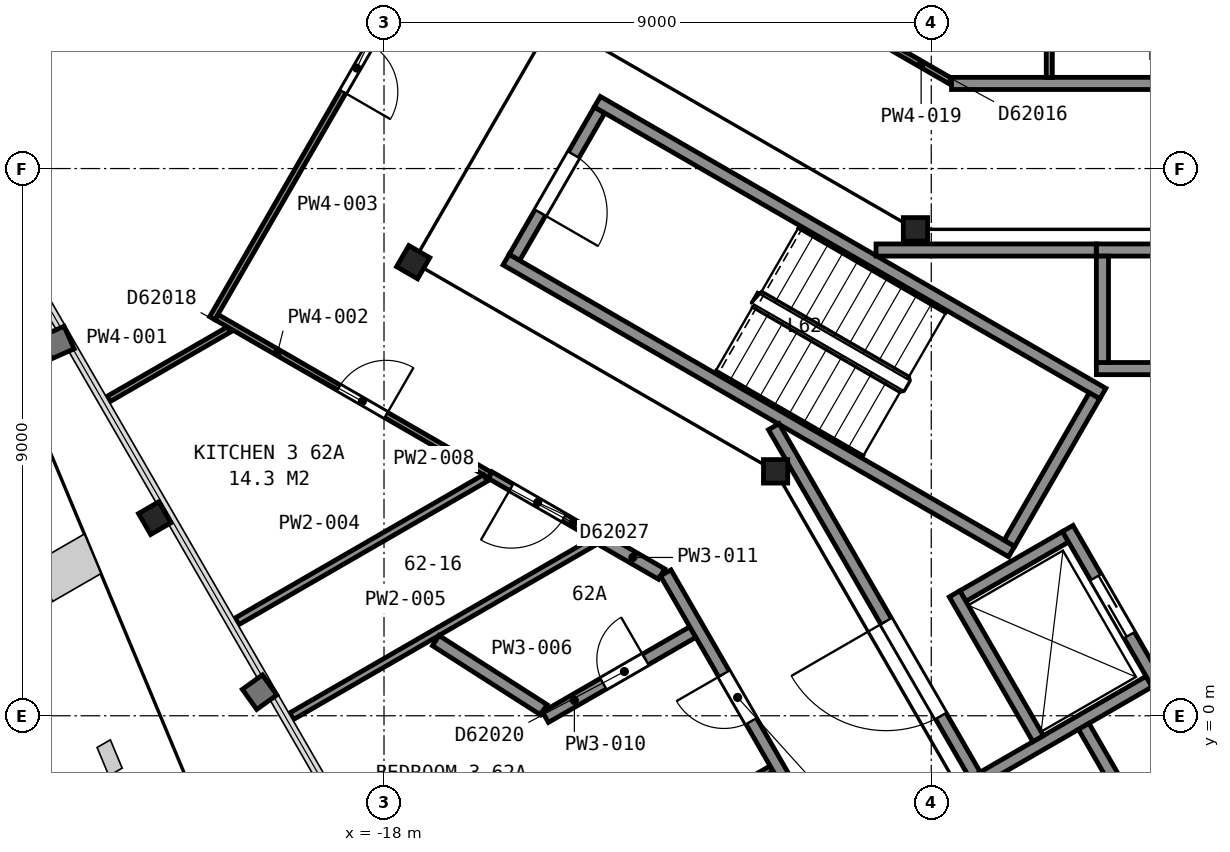
"""IFC4 building model, lengths in metres.
Left out: names, types, materials, properties, quantities, classifications, styles, units other than length and angle.
Written with IfcOpenShell. Run it as: python <this file> out.ifc"""

import sys

from ifc_helpers import new_model, si_unit, direction, frame, frame_2d, origin, origin_2d, place, context, subcontext, project, spatial, rectangle, i_section, extrude, element, fill, save


model = new_model("IFC4")
c1 = context("Model", 3, precision=1e-05, world=origin(), true_north=direction((0.0, 1.0)))
c2 = subcontext(c1, "Body", "Model", "MODEL_VIEW")
j1 = project(units=[si_unit("LENGTHUNIT", "METRE"), si_unit("PLANEANGLEUNIT", "RADIAN")], contexts=[c1])
p1 = place(None, origin())
s1 = spatial("IfcSite", under=j1, at=p1, CompositionType="ELEMENT")
p2 = place(p1, origin())
s2 = spatial("IfcBuilding", under=s1, at=p2, CompositionType="ELEMENT")
p3 = place(p2, frame((0.0, 0.0, 247.1)))
s3 = spatial("IfcBuildingStorey", under=s2, at=p3, CompositionType="ELEMENT", Elevation=247.1)
p4 = place(p3, frame((-21.77, 3.25, 0.035), z_axis=(0.0, 0.0, 1.0), x_axis=(-0.5, 0.866025403784, 0.0)))
e1 = element("IfcColumn", 1, at=p4, inside=s3, PredefinedType="COLUMN", context=c2, shape_type="SweptSolid", body=[
    extrude(i_section(OverallWidth=0.399, OverallDepth=0.386, WebThickness=0.021, FlangeThickness=0.033, FilletRadius=0.015, at=origin_2d()), origin(), (0.0, 0.0, 1.0), 3.665),
])
p5 = place(p3, frame((-9.26, 8.0, 0.0), z_axis=(0.0, 0.0, 1.0), x_axis=(1.0, 0.0, 0.0)))
e2 = element("IfcColumn", 2, at=p5, inside=s3, PredefinedType="COLUMN", context=c2, shape_type="SweptSolid", body=[
    extrude(i_section(OverallWidth=0.399, OverallDepth=0.386, WebThickness=0.021, FlangeThickness=0.033, FilletRadius=0.015, at=origin_2d()), origin(), (0.0, 0.0, 1.0), 3.7),
])
p6 = place(p3, frame((-17.52, 7.46, 0.0), z_axis=(0.0, 0.0, 1.0), x_axis=(0.5, 0.866025403784, 0.0)))
e3 = element("IfcColumn", 3, at=p6, inside=s3, PredefinedType="COLUMN", context=c2, shape_type="SweptSolid", body=[
    extrude(i_section(OverallWidth=0.401, OverallDepth=0.399, WebThickness=0.025, FlangeThickness=0.04, FilletRadius=0.015, at=origin_2d()), origin(), (0.0, 0.0, 1.0), 3.7),
])
p7 = place(p3, frame((-11.56, 4.02, 0.0), z_axis=(0.0, 0.0, 1.0), x_axis=(1.0, 0.0, 0.0)))
e4 = element("IfcColumn", 4, at=p7, inside=s3, PredefinedType="COLUMN", context=c2, shape_type="SweptSolid", body=[
    extrude(i_section(OverallWidth=0.399, OverallDepth=0.386, WebThickness=0.021, FlangeThickness=0.033, FilletRadius=0.015, at=origin_2d()), origin(), (0.0, 0.0, 1.0), 3.7),
])
p8 = place(p3, frame((-14.455, 9.962, 0.0), z_axis=(0.0, 0.0, 1.0), x_axis=(-0.500049511043, -0.865996816683, 0.0)))
e5 = element("IfcWall", 5, at=p8, inside=s3, PredefinedType="PARTITIONING", context=c2, shape_type="SweptSolid", body=[
    extrude(rectangle(XDim=2.8, YDim=0.2, at=frame_2d((1.4, 0.0))), origin(), (0.0, 0.0, 1.0), 3.45),
])
p9 = place(p8, frame((0.85, 0.0, 0.0)))
e6 = element("IfcOpeningElement", 6, at=p9, cuts=e5, PredefinedType="OPENING", context=c2, shape_type="SweptSolid", body=[
    extrude(rectangle(XDim=1.1, YDim=2.1, at=frame_2d((0.55, 1.05))), frame((0.0, 0.11, 0.0), z_axis=(0.0, -1.0, 0.0), x_axis=(1.0, 0.0, 0.0)), (0.0, 0.0, 1.0), 0.22),
])
for number, where, z_axis, x_axis in (
    (7, (-7.678, 2.701, 0.0), (0.0, 0.0, 1.0), (-0.866, 0.5, 0.0)),
    (8, (-6.178, 5.299, 0.0), (0.0, 0.0, 1.0), (-0.866, 0.5, 0.0)),
):
    element("IfcWall", number, at=place(p3, frame(where, z_axis=z_axis, x_axis=x_axis)), inside=s3, PredefinedType="PARTITIONING", context=c2, shape_type="SweptSolid", body=[
        extrude(rectangle(XDim=9.6, YDim=0.2, at=frame_2d((4.8, 0.0))), origin(), (0.0, 0.0, 1.0), 3.45),
    ])
p10 = place(p3, frame((-6.315, 5.262, 0.0), z_axis=(0.0, 0.0, 1.0), x_axis=(-0.500049511043, -0.865996816683, 0.0)))
e9 = element("IfcWall", 9, at=p10, inside=s3, PredefinedType="PARTITIONING", context=c2, shape_type="SweptSolid", body=[
    extrude(rectangle(XDim=2.8, YDim=0.2, at=frame_2d((1.4, 0.0))), origin(), (0.0, 0.0, 1.0), 3.45),
])
for number, where, z_axis, x_axis in (
    (10, (-6.285, 5.71, 0.0), (0.0, 0.0, 1.0), (1.0, 0.0, 0.0)),
    (11, (-6.285, 7.66, 0.0), (0.0, 0.0, 1.0), (1.0, 0.0, 0.0)),
):
    element("IfcWall", number, at=place(p3, frame(where, z_axis=z_axis, x_axis=x_axis)), inside=s3, PredefinedType="PARTITIONING", context=c2, shape_type="SweptSolid", body=[
        extrude(rectangle(XDim=2.35, YDim=0.2, at=frame_2d((1.175, 0.0))), origin(), (0.0, 0.0, 1.0), 3.7),
    ])
p11 = place(p3, frame((-8.145, -1.013, 0.0), z_axis=(0.0, 0.0, 1.0), x_axis=(0.866016494683, 0.500015430699, 0.0)))
e12 = element("IfcWall", 12, at=p11, inside=s3, PredefinedType="PARTITIONING", context=c2, shape_type="SweptSolid", body=[
    extrude(rectangle(XDim=3.15, YDim=0.2, at=frame_2d((1.575, 0.0))), origin(), (0.0, 0.0, 1.0), 3.7),
])
p12 = place(p3, frame((-8.48, 1.969, 0.0), z_axis=(0.0, 0.0, 1.0), x_axis=(0.866000020948, 0.500043961785, 0.0)))
e13 = element("IfcWall", 13, at=p12, inside=s3, PredefinedType="PARTITIONING", context=c2, shape_type="SweptSolid", body=[
    extrude(rectangle(XDim=1.95, YDim=0.2, at=frame_2d((0.975, 0.0))), origin(), (0.0, 0.0, 1.0), 3.7),
])
p13 = place(p3, frame((-6.185, 5.81, 0.0), z_axis=(0.0, 0.0, 1.0), x_axis=(0.0, 1.0, 0.0)))
e14 = element("IfcWall", 14, at=p13, inside=s3, PredefinedType="PARTITIONING", context=c2, shape_type="SweptSolid", body=[
    extrude(rectangle(XDim=1.75, YDim=0.2, at=frame_2d((0.875, 0.0))), origin(), (0.0, 0.0, 1.0), 3.7),
])
p14 = place(p3, frame((-5.28, 0.525, 0.0), z_axis=(0.0, 0.0, 1.0), x_axis=(-0.500037662692, 0.866003658127, 0.0)))
e15 = element("IfcWall", 15, at=p14, inside=s3, PredefinedType="PARTITIONING", context=c2, shape_type="SweptSolid", body=[
    extrude(rectangle(XDim=2.95, YDim=0.2, at=frame_2d((1.475, 0.0))), origin(), (0.0, 0.0, 1.0), 3.7),
])
p15 = place(p14, frame((0.925, 0.0, 0.0)))
e16 = element("IfcOpeningElement", 16, at=p15, cuts=e15, PredefinedType="OPENING", context=c2, shape_type="SweptSolid", body=[
    extrude(rectangle(XDim=1.1, YDim=2.1, at=frame_2d((0.55, 1.05))), frame((0.0, 0.11, 0.0), z_axis=(0.0, -1.0, 0.0), x_axis=(1.0, 0.0, 0.0)), (0.0, 0.0, 1.0), 0.22),
])
p16 = place(p3, frame((-5.318, -2.21, 0.0), z_axis=(0.0, 0.0, 1.0), x_axis=(-0.499938297808, 0.866061024631, 0.0)))
e17 = element("IfcWall", 17, at=p16, inside=s3, PredefinedType="PARTITIONING", context=c2, shape_type="SweptSolid", body=[
    extrude(rectangle(XDim=2.35, YDim=0.2, at=frame_2d((1.175, 0.0))), origin(), (0.0, 0.0, 1.0), 3.7),
])
p17 = place(p3, frame((-7.242, -0.376, 0.0), z_axis=(0.0, 0.0, 1.0), x_axis=(-0.499996545922, 0.866027397988, 0.0)))
e18 = element("IfcWall", 18, at=p17, inside=s3, PredefinedType="PARTITIONING", context=c2, shape_type="SweptSolid", body=[
    extrude(rectangle(XDim=2.75, YDim=0.2, at=frame_2d((1.375, 0.0))), origin(), (0.0, 0.0, 1.0), 3.7),
])
p18 = place(p3, frame((-11.591, 4.755, 0.0), z_axis=(0.0, 0.0, 1.0), x_axis=(0.500043977787, -0.866000011708, 0.0)))
e19 = element("IfcWall", 19, at=p18, inside=s3, PredefinedType="PARTITIONING", context=c2, shape_type="SweptSolid", body=[
    extrude(rectangle(XDim=6.617, YDim=0.2, at=frame_2d((3.308, 0.0))), origin(), (0.0, 0.0, 1.0), 3.45),
])
p19 = place(p18, frame((3.695, 0.0, 0.0)))
e20 = element("IfcOpeningElement", 20, at=p19, cuts=e19, PredefinedType="OPENING", context=c2, shape_type="SweptSolid", body=[
    extrude(rectangle(XDim=1.8, YDim=2.1, at=frame_2d((0.9, 1.05))), frame((0.0, 0.11, 0.0), z_axis=(0.0, -1.0, 0.0), x_axis=(1.0, 0.0, 0.0)), (0.0, 0.0, 1.0), 0.22),
])
p20 = place(p3, frame((-9.908, 7.66, 0.0), z_axis=(0.0, 0.0, 1.0), x_axis=(1.0, 0.0, 0.0)))
e21 = element("IfcWall", 21, at=p20, inside=s3, PredefinedType="PARTITIONING", context=c2, shape_type="SweptSolid", body=[
    extrude(rectangle(XDim=3.621, YDim=0.2, at=frame_2d((1.811, 0.0))), origin(), (0.0, 0.0, 1.0), 3.45),
])
p21 = place(p3, frame((-22.53, 5.21, 0.0), z_axis=(0.0, 0.0, 1.0), x_axis=(0.865865073245, 0.500277597875, 0.0)))
e22 = element("IfcWall", 22, at=p21, inside=s3, PredefinedType="PARTITIONING", context=c2, shape_type="SweptSolid", body=[
    extrude(rectangle(XDim=2.284, YDim=0.1, at=frame_2d((1.142, 0.0))), origin(), (0.0, 0.0, 1.0), 2.713),
])
p22 = place(p3, frame((-16.253, 3.957, 0.0), z_axis=(0.0, 0.0, 1.0), x_axis=(-0.866006514596, 0.500032715607, 0.0)))
e23 = element("IfcWall", 23, at=p22, inside=s3, PredefinedType="PARTITIONING", context=c2, shape_type="SweptSolid", body=[
    extrude(rectangle(XDim=5.199, YDim=0.1, at=frame_2d((2.6, 0.0))), origin(), (0.0, 0.0, 1.0), 2.713),
])
p23 = place(p22, frame((1.978, 0.0, 0.0)))
e24 = element("IfcOpeningElement", 24, at=p23, cuts=e23, PredefinedType="OPENING", context=c2, shape_type="SweptSolid", body=[
    extrude(rectangle(XDim=0.9, YDim=2.1, at=frame_2d((0.45, 1.05))), frame((0.0, 0.06, 0.0), z_axis=(0.0, -1.0, 0.0), x_axis=(1.0, 0.0, 0.0)), (0.0, 0.0, 1.0), 0.12),
])
p24 = place(p3, frame((-20.824, 6.539, 0.0), z_axis=(0.0, 0.0, 1.0), x_axis=(0.500297300687, 0.865853689098, 0.0)))
e25 = element("IfcWall", 25, at=p24, inside=s3, PredefinedType="PARTITIONING", context=c2, shape_type="SweptSolid", body=[
    extrude(rectangle(XDim=9.496, YDim=0.1, at=frame_2d((4.748, 0.0))), origin(), (0.0, 0.0, 1.0), 2.713),
])
p25 = place(p24, frame((4.3, 0.0, 0.0)))
e26 = element("IfcOpeningElement", 26, at=p25, cuts=e25, PredefinedType="OPENING", context=c2, shape_type="SweptSolid", body=[
    extrude(rectangle(XDim=0.9, YDim=2.1, at=frame_2d((0.45, 1.05))), frame((0.0, 0.06, 0.0), z_axis=(0.0, -1.0, 0.0), x_axis=(1.0, 0.0, 0.0)), (0.0, 0.0, 1.0), 0.12),
])
p26 = place(p3, frame((-20.418, 1.553, 0.0), z_axis=(0.0, 0.0, 1.0), x_axis=(0.8660976733, 0.49987480463, 0.0)))
e27 = element("IfcWall", 27, at=p26, inside=s3, PredefinedType="PARTITIONING", context=c2, shape_type="SweptSolid", body=[
    extrude(rectangle(XDim=4.717, YDim=0.125, at=frame_2d((2.358, 0.0))), origin(), (0.0, 0.0, 1.0), 2.713),
])
p27 = place(p3, frame((-19.518, -0.006, 0.0), z_axis=(0.0, 0.0, 1.0), x_axis=(0.866072118736, 0.499919078599, 0.0)))
e28 = element("IfcWall", 28, at=p27, inside=s3, PredefinedType="PARTITIONING", context=c2, shape_type="SweptSolid", body=[
    extrude(rectangle(XDim=5.912, YDim=0.125, at=frame_2d((2.956, 0.0))), origin(), (0.0, 0.0, 1.0), 2.713),
])
p28 = place(p3, frame((-17.149, 1.236, 0.0), z_axis=(0.0, 0.0, 1.0), x_axis=(0.842376529327, -0.538889397593, 0.0)))
e29 = element("IfcWall", 29, at=p28, inside=s3, PredefinedType="PARTITIONING", context=c2, shape_type="SweptSolid", body=[
    extrude(rectangle(XDim=2.108, YDim=0.2, at=frame_2d((1.054, 0.0))), origin(), (0.0, 0.0, 1.0), 2.713),
])
p29 = place(p3, frame((-17.171, -4.071, 0.0), z_axis=(0.0, 0.0, 1.0), x_axis=(0.865973383125, 0.500090091603, 0.0)))
e30 = element("IfcWall", 30, at=p29, inside=s3, PredefinedType="PARTITIONING", context=c2, shape_type="SweptSolid", body=[
    extrude(rectangle(XDim=6.4, YDim=0.1, at=frame_2d((3.2, 0.0))), origin(), (0.0, 0.0, 1.0), 2.713),
])
p30 = place(p3, frame((-16.253, 3.957, 0.0), z_axis=(0.0, 0.0, 1.0), x_axis=(0.866173232673, -0.499743865396, 0.0)))
e31 = element("IfcWall", 31, at=p30, inside=s3, PredefinedType="PARTITIONING", context=c2, shape_type="SweptSolid", body=[
    extrude(rectangle(XDim=1.974, YDim=0.125, at=frame_2d((0.987, 0.0))), origin(), (0.0, 0.0, 1.0), 2.713),
])
p31 = place(p30, frame((0.4, 0.0, 0.0)))
e32 = element("IfcOpeningElement", 32, at=p31, cuts=e31, PredefinedType="OPENING", context=c2, shape_type="SweptSolid", body=[
    extrude(rectangle(XDim=1.0, YDim=2.1, at=frame_2d((0.5, 1.05))), frame((0.0, 0.073, 0.0), z_axis=(0.0, -1.0, 0.0), x_axis=(1.0, 0.0, 0.0)), (0.0, 0.0, 1.0), 0.145),
])
p32 = place(p3, frame((-15.346, -0.023, 0.0), z_axis=(0.0, 0.0, 1.0), x_axis=(0.865969158485, 0.500097407065, 0.0)))
e33 = element("IfcWall", 33, at=p32, inside=s3, PredefinedType="PARTITIONING", context=c2, shape_type="SweptSolid", body=[
    extrude(rectangle(XDim=2.799, YDim=0.2, at=frame_2d((1.4, 0.0))), origin(), (0.0, 0.0, 1.0), 2.713),
])
p33 = place(p32, frame((1.1, 0.0, 0.0)))
e34 = element("IfcOpeningElement", 34, at=p33, cuts=e33, PredefinedType="OPENING", context=c2, shape_type="SweptSolid", body=[
    extrude(rectangle(XDim=0.8, YDim=2.1, at=frame_2d((0.4, 1.05))), frame((0.0, 0.11, 0.0), z_axis=(0.0, -1.0, 0.0), x_axis=(1.0, 0.0, 0.0)), (0.0, 0.0, 1.0), 0.22),
])
p34 = place(p3, frame((-14.381, 2.877, 0.0), z_axis=(0.0, 0.0, 1.0), x_axis=(0.866215333661, -0.499670887416, 0.0)))
e35 = element("IfcWall", 35, at=p34, inside=s3, PredefinedType="PARTITIONING", context=c2, shape_type="SweptSolid", body=[
    extrude(rectangle(XDim=1.093, YDim=0.2, at=frame_2d((0.546, 0.0))), origin(), (0.0, 0.0, 1.0), 2.713),
])
p35 = place(p3, frame((-4.675, -12.706, 0.0), z_axis=(0.0, 0.0, 1.0), x_axis=(-0.499972470324, 0.866041297467, 0.0)))
e36 = element("IfcWall", 36, at=p35, inside=s3, PredefinedType="PARTITIONING", context=c2, shape_type="SweptSolid", body=[
    extrude(rectangle(XDim=17.385, YDim=0.2, at=frame_2d((8.692, 0.0))), origin(), (0.0, 0.0, 1.0), 2.713),
])
p36 = place(p35, frame((14.57, 0.0, 0.0)))
e37 = element("IfcOpeningElement", 37, at=p36, cuts=e36, PredefinedType="OPENING", context=c2, shape_type="SweptSolid", body=[
    extrude(rectangle(XDim=0.9, YDim=2.1, at=frame_2d((0.45, 1.05))), frame((0.0, 0.11, 0.0), z_axis=(0.0, -1.0, 0.0), x_axis=(1.0, 0.0, 0.0)), (0.0, 0.0, 1.0), 0.22),
])
p37 = place(p35, frame((11.777, 0.0, 0.0)))
e38 = element("IfcOpeningElement", 38, at=p37, cuts=e36, PredefinedType="OPENING", context=c2, shape_type="SweptSolid", body=[
    extrude(rectangle(XDim=0.9, YDim=2.1, at=frame_2d((0.45, 1.05))), frame((0.0, 0.11, 0.0), z_axis=(0.0, -1.0, 0.0), x_axis=(1.0, 0.0, 0.0)), (0.0, 0.0, 1.0), 0.22),
])
p38 = place(p35, frame((5.095, 0.0, 0.0)))
e39 = element("IfcOpeningElement", 39, at=p38, cuts=e36, PredefinedType="OPENING", context=c2, shape_type="SweptSolid", body=[
    extrude(rectangle(XDim=0.9, YDim=2.1, at=frame_2d((0.45, 1.05))), frame((0.0, 0.11, 0.0), z_axis=(0.0, -1.0, 0.0), x_axis=(1.0, 0.0, 0.0)), (0.0, 0.0, 1.0), 0.22),
])
p39 = place(p3, frame((-11.357, 11.982, 0.0), z_axis=(0.0, 0.0, 1.0), x_axis=(0.866039032844, -0.499976393034, 0.0)))
e40 = element("IfcWall", 40, at=p39, inside=s3, PredefinedType="PARTITIONING", context=c2, shape_type="SweptSolid", body=[
    extrude(rectangle(XDim=3.079, YDim=0.1, at=frame_2d((1.54, 0.0))), origin(), (0.0, 0.0, 1.0), 2.713),
])
p40 = place(p39, frame((1.08, 0.0, 0.0)))
e41 = element("IfcOpeningElement", 41, at=p40, cuts=e40, PredefinedType="OPENING", context=c2, shape_type="SweptSolid", body=[
    extrude(rectangle(XDim=0.9, YDim=2.1, at=frame_2d((0.45, 1.05))), frame((0.0, 0.06, 0.0), z_axis=(0.0, -1.0, 0.0), x_axis=(1.0, 0.0, 0.0)), (0.0, 0.0, 1.0), 0.12),
])
p41 = place(p3, frame((-8.667, 10.4, 0.0), z_axis=(0.0, 0.0, 1.0), x_axis=(1.0, 0.0, 0.0)))
e42 = element("IfcWall", 42, at=p41, inside=s3, PredefinedType="PARTITIONING", context=c2, shape_type="SweptSolid", body=[
    extrude(rectangle(XDim=17.384, YDim=0.2, at=frame_2d((8.692, 0.0))), origin(), (0.0, 0.0, 1.0), 2.713),
])
p42 = place(p41, frame((12.425, 0.0, 0.0)))
e43 = element("IfcOpeningElement", 43, at=p42, cuts=e42, PredefinedType="OPENING", context=c2, shape_type="SweptSolid", body=[
    extrude(rectangle(XDim=0.9, YDim=2.1, at=frame_2d((0.45, 1.05))), frame((0.0, 0.11, 0.0), z_axis=(0.0, -1.0, 0.0), x_axis=(1.0, 0.0, 0.0)), (0.0, 0.0, 1.0), 0.22),
])
p43 = place(p41, frame((7.716, 0.0, 0.0)))
e44 = element("IfcOpeningElement", 44, at=p43, cuts=e42, PredefinedType="OPENING", context=c2, shape_type="SweptSolid", body=[
    extrude(rectangle(XDim=0.9, YDim=2.1, at=frame_2d((0.45, 1.05))), frame((0.0, 0.11, 0.0), z_axis=(0.0, -1.0, 0.0), x_axis=(1.0, 0.0, 0.0)), (0.0, 0.0, 1.0), 0.22),
])
p44 = place(p41, frame((3.358, 0.0, 0.0)))
e45 = element("IfcOpeningElement", 45, at=p44, cuts=e42, PredefinedType="OPENING", context=c2, shape_type="SweptSolid", body=[
    extrude(rectangle(XDim=0.9, YDim=2.1, at=frame_2d((0.45, 1.05))), frame((0.0, 0.11, 0.0), z_axis=(0.0, -1.0, 0.0), x_axis=(1.0, 0.0, 0.0)), (0.0, 0.0, 1.0), 0.22),
])
p45 = place(p3, frame((-7.059, 10.5, 0.0), z_axis=(0.0, 0.0, 1.0), x_axis=(0.0, 1.0, 0.0)))
e46 = element("IfcWall", 46, at=p45, inside=s3, PredefinedType="PARTITIONING", context=c2, shape_type="SweptSolid", body=[
    extrude(rectangle(XDim=6.406, YDim=0.1, at=frame_2d((3.203, 0.0))), origin(), (0.0, 0.0, 1.0), 2.713),
])
p46 = place(p9, origin())
e47 = element("IfcDoor", 47, at=p46, inside=s3, OperationType="SINGLE_SWING_RIGHT", PredefinedType="DOOR", context=c2, shape_type="SweptSolid", body=[
    extrude(rectangle(XDim=1.1, YDim=2.1, at=frame_2d((0.55, 1.05))), frame((0.0, 0.025, 0.0), z_axis=(0.0, -1.0, 0.0), x_axis=(1.0, 0.0, 0.0)), (0.0, 0.0, 1.0), 0.05),
])
fill(e6, e47)
p47 = place(p15, origin())
e48 = element("IfcDoor", 48, at=p47, inside=s3, OperationType="SLIDING_TO_LEFT", PredefinedType="DOOR", context=c2, shape_type="SweptSolid", body=[
    extrude(rectangle(XDim=1.1, YDim=2.1, at=frame_2d((0.55, 1.05))), frame((0.0, 0.025, 0.0), z_axis=(0.0, -1.0, 0.0), x_axis=(1.0, 0.0, 0.0)), (0.0, 0.0, 1.0), 0.05),
])
fill(e16, e48)
p48 = place(p19, origin())
e49 = element("IfcDoor", 49, at=p48, inside=s3, OperationType="DOUBLE_DOOR_SINGLE_SWING", PredefinedType="DOOR", context=c2, shape_type="SweptSolid", body=[
    extrude(rectangle(XDim=1.8, YDim=2.1, at=frame_2d((0.9, 1.05))), frame((0.0, 0.025, 0.0), z_axis=(0.0, -1.0, 0.0), x_axis=(1.0, 0.0, 0.0)), (0.0, 0.0, 1.0), 0.05),
])
fill(e20, e49)
p49 = place(p23, origin())
e50 = element("IfcDoor", 50, at=p49, inside=s3, OperationType="SINGLE_SWING_LEFT", PredefinedType="DOOR", context=c2, shape_type="SweptSolid", body=[
    extrude(rectangle(XDim=0.9, YDim=2.1, at=frame_2d((0.45, 1.05))), frame((0.0, 0.025, 0.0), z_axis=(0.0, -1.0, 0.0), x_axis=(1.0, 0.0, 0.0)), (0.0, 0.0, 1.0), 0.05),
])
fill(e24, e50)
p50 = place(p25, origin())
e51 = element("IfcDoor", 51, at=p50, inside=s3, OperationType="SINGLE_SWING_LEFT", PredefinedType="DOOR", context=c2, shape_type="SweptSolid", body=[
    extrude(rectangle(XDim=0.9, YDim=2.1, at=frame_2d((0.45, 1.05))), frame((0.0, 0.025, 0.0), z_axis=(0.0, -1.0, 0.0), x_axis=(1.0, 0.0, 0.0)), (0.0, 0.0, 1.0), 0.05),
])
fill(e26, e51)
p51 = place(p31, origin())
e52 = element("IfcDoor", 52, at=p51, inside=s3, OperationType="SINGLE_SWING_LEFT", PredefinedType="DOOR", context=c2, shape_type="SweptSolid", body=[
    extrude(rectangle(XDim=1.0, YDim=2.1, at=frame_2d((0.5, 1.05))), frame((0.0, 0.025, 0.0), z_axis=(0.0, -1.0, 0.0), x_axis=(1.0, 0.0, 0.0)), (0.0, 0.0, 1.0), 0.05),
])
fill(e32, e52)
p52 = place(p33, origin())
e53 = element("IfcDoor", 53, at=p52, inside=s3, OperationType="SINGLE_SWING_RIGHT", PredefinedType="DOOR", context=c2, shape_type="SweptSolid", body=[
    extrude(rectangle(XDim=0.8, YDim=2.1, at=frame_2d((0.4, 1.05))), frame((0.0, 0.025, 0.0), z_axis=(0.0, -1.0, 0.0), x_axis=(1.0, 0.0, 0.0)), (0.0, 0.0, 1.0), 0.05),
])
fill(e34, e53)
p53 = place(p36, origin())
e54 = element("IfcDoor", 54, at=p53, inside=s3, OperationType="SINGLE_SWING_RIGHT", PredefinedType="DOOR", context=c2, shape_type="SweptSolid", body=[
    extrude(rectangle(XDim=0.9, YDim=2.1, at=frame_2d((0.45, 1.05))), frame((0.0, 0.025, 0.0), z_axis=(0.0, -1.0, 0.0), x_axis=(1.0, 0.0, 0.0)), (0.0, 0.0, 1.0), 0.05),
])
fill(e37, e54)
save(model, sys.argv[1])
